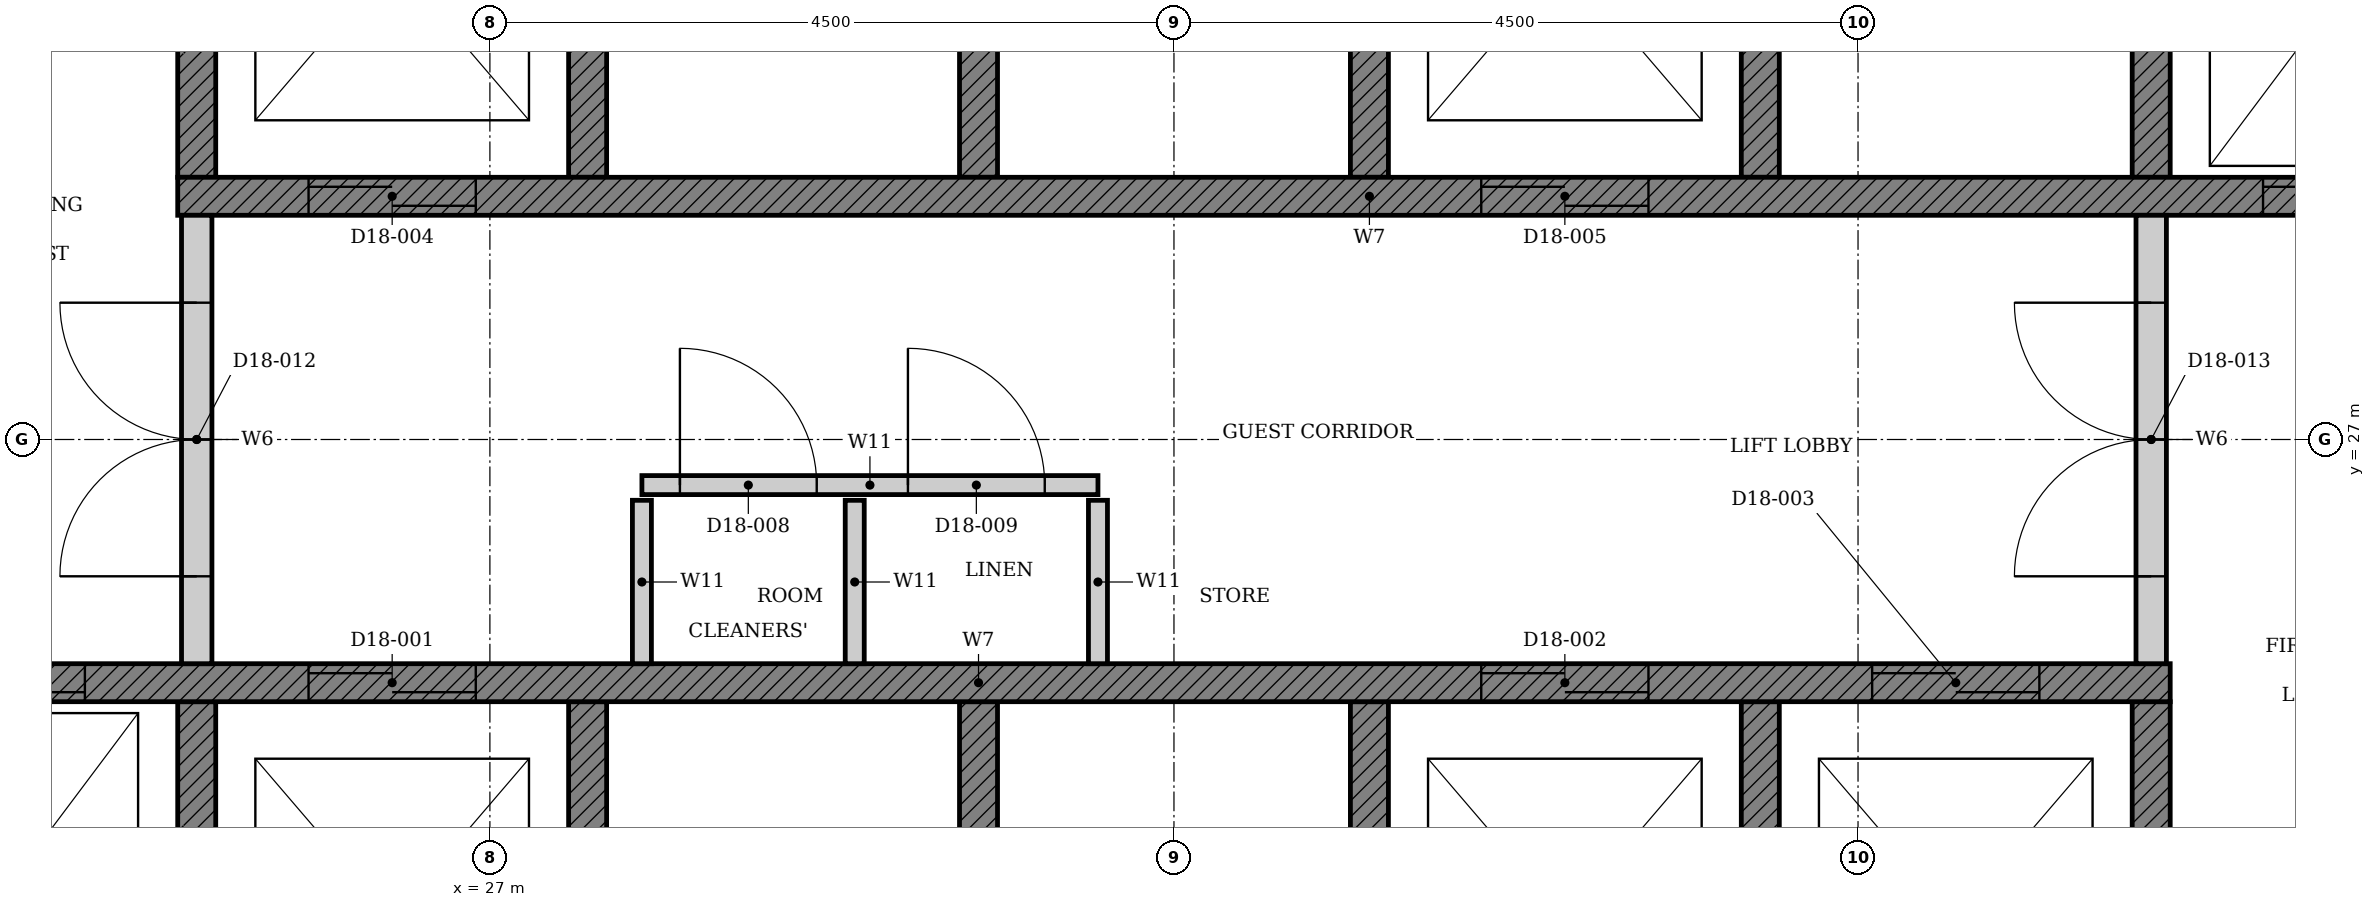
"""IFC4 building model, lengths in metres.
Left out: names, types, materials, properties, quantities, classifications, styles, units other than length and angle.
Written with IfcOpenShell. Run it as: python <this file> out.ifc"""

import sys

from ifc_helpers import new_model, si_unit, direction, frame, frame_2d, origin, place, context, subcontext, project, spatial, polyline, rectangle, outline, extrude, element, fill, save


model = new_model("IFC4")
c1 = context("Model", 3, precision=1e-05, world=origin(), true_north=direction((0.0, 1.0)))
c2 = subcontext(c1, "Body", "Model", "MODEL_VIEW")
j1 = project(units=[si_unit("LENGTHUNIT", "METRE"), si_unit("PLANEANGLEUNIT", "RADIAN")], contexts=[c1])
p1 = place(None, origin())
s1 = spatial("IfcSite", under=j1, at=p1, CompositionType="ELEMENT")
p2 = place(p1, origin())
s2 = spatial("IfcBuilding", under=s1, at=p2, CompositionType="ELEMENT")
p3 = place(p2, frame((0.0, 0.0, 78.0)))
s3 = spatial("IfcBuildingStorey", under=s2, at=p3, CompositionType="ELEMENT", Elevation=78.0)
p4 = place(p3, origin())
e1 = element("IfcWall", 1, at=p4, inside=s3, PredefinedType="SHEAR", context=c2, shape_type="SweptSolid", body=[
    extrude(outline(polyline([(22.375, 22.35), (38.053, 22.35), (38.053, 25.275), (37.803, 25.275), (37.803, 22.65), (35.482, 22.65), (35.482, 25.275), (35.232, 25.275), (35.232, 22.65), (32.911, 22.65), (32.911, 25.275), (32.661, 25.275), (32.661, 22.65), (30.339, 22.65), (30.339, 25.275), (30.089, 25.275), (30.089, 22.65), (27.768, 22.65), (27.768, 25.275), (27.518, 25.275), (27.518, 22.65), (25.197, 22.65), (25.197, 25.275), (24.947, 25.275), (24.947, 22.65), (22.625, 22.65), (22.625, 25.275), (22.375, 25.275), (22.375, 22.35)])), origin(), (0.0, 0.0, 1.0), 3.3),
])
p5 = place(p3, origin())
e2 = element("IfcWall", 2, at=p5, inside=s3, PredefinedType="SHEAR", context=c2, shape_type="SweptSolid", body=[
    extrude(outline(polyline([(24.947, 28.725), (25.197, 28.725), (25.197, 31.35), (27.518, 31.35), (27.518, 28.725), (27.768, 28.725), (27.768, 31.35), (30.089, 31.35), (30.089, 28.725), (30.339, 28.725), (30.339, 31.35), (32.661, 31.35), (32.661, 28.725), (32.911, 28.725), (32.911, 31.35), (35.232, 31.35), (35.232, 28.725), (35.482, 28.725), (35.482, 31.35), (37.803, 31.35), (37.803, 28.725), (38.053, 28.725), (38.053, 31.35), (40.375, 31.35), (40.375, 28.725), (40.625, 28.725), (40.625, 31.65), (24.947, 31.65), (24.947, 28.725)])), origin(), (0.0, 0.0, 1.0), 3.3),
])
p6 = place(p3, frame((22.375, 25.4, 0.0), z_axis=(0.0, 0.0, 1.0), x_axis=(1.0, 0.0, 0.0)))
e3 = element("IfcWall", 3, at=p6, inside=s3, PredefinedType="SHEAR", context=c2, shape_type="SweptSolid", body=[
    extrude(rectangle(XDim=15.678, YDim=0.25, at=frame_2d((7.839, 0.0))), origin(), (0.0, 0.0, 1.0), 3.3),
])
p7 = place(p6, frame((3.432, 0.0, 0.0)))
e4 = element("IfcOpeningElement", 4, at=p7, cuts=e3, PredefinedType="OPENING", context=c2, shape_type="SweptSolid", body=[
    extrude(rectangle(XDim=1.1, YDim=2.1, at=frame_2d((0.55, 1.05))), frame((0.0, 0.135, 0.0), z_axis=(0.0, -1.0, 0.0), x_axis=(1.0, 0.0, 0.0)), (0.0, 0.0, 1.0), 0.27),
])
p8 = place(p6, frame((11.146, 0.0, 0.0)))
e5 = element("IfcOpeningElement", 5, at=p8, cuts=e3, PredefinedType="OPENING", context=c2, shape_type="SweptSolid", body=[
    extrude(rectangle(XDim=1.1, YDim=2.1, at=frame_2d((0.55, 1.05))), frame((0.0, 0.135, 0.0), z_axis=(0.0, -1.0, 0.0), x_axis=(1.0, 0.0, 0.0)), (0.0, 0.0, 1.0), 0.27),
])
p9 = place(p6, frame((13.718, 0.0, 0.0)))
e6 = element("IfcOpeningElement", 6, at=p9, cuts=e3, PredefinedType="OPENING", context=c2, shape_type="SweptSolid", body=[
    extrude(rectangle(XDim=1.1, YDim=2.1, at=frame_2d((0.55, 1.05))), frame((0.0, 0.135, 0.0), z_axis=(0.0, -1.0, 0.0), x_axis=(1.0, 0.0, 0.0)), (0.0, 0.0, 1.0), 0.27),
])
p10 = place(p6, frame((0.861, 0.0, 0.0)))
e7 = element("IfcOpeningElement", 7, at=p10, cuts=e3, PredefinedType="OPENING", context=c2, shape_type="SweptSolid", body=[
    extrude(rectangle(XDim=1.1, YDim=2.1, at=frame_2d((0.55, 1.05))), frame((0.0, 0.135, 0.0), z_axis=(0.0, -1.0, 0.0), x_axis=(1.0, 0.0, 0.0)), (0.0, 0.0, 1.0), 0.27),
])
p11 = place(p3, frame((24.947, 28.6, 0.0), z_axis=(0.0, 0.0, 1.0), x_axis=(1.0, 0.0, 0.0)))
e8 = element("IfcWall", 8, at=p11, inside=s3, PredefinedType="SHEAR", context=c2, shape_type="SweptSolid", body=[
    extrude(rectangle(XDim=15.678, YDim=0.25, at=frame_2d((7.839, 0.0))), origin(), (0.0, 0.0, 1.0), 3.3),
])
p12 = place(p11, frame((0.861, 0.0, 0.0)))
e9 = element("IfcOpeningElement", 9, at=p12, cuts=e8, PredefinedType="OPENING", context=c2, shape_type="SweptSolid", body=[
    extrude(rectangle(XDim=1.1, YDim=2.1, at=frame_2d((0.55, 1.05))), frame((0.0, 0.135, 0.0), z_axis=(0.0, -1.0, 0.0), x_axis=(1.0, 0.0, 0.0)), (0.0, 0.0, 1.0), 0.27),
])
p13 = place(p11, frame((8.575, 0.0, 0.0)))
e10 = element("IfcOpeningElement", 10, at=p13, cuts=e8, PredefinedType="OPENING", context=c2, shape_type="SweptSolid", body=[
    extrude(rectangle(XDim=1.1, YDim=2.1, at=frame_2d((0.55, 1.05))), frame((0.0, 0.135, 0.0), z_axis=(0.0, -1.0, 0.0), x_axis=(1.0, 0.0, 0.0)), (0.0, 0.0, 1.0), 0.27),
])
p14 = place(p11, frame((13.718, 0.0, 0.0)))
e11 = element("IfcOpeningElement", 11, at=p14, cuts=e8, PredefinedType="OPENING", context=c2, shape_type="SweptSolid", body=[
    extrude(rectangle(XDim=1.1, YDim=2.1, at=frame_2d((0.55, 1.05))), frame((0.0, 0.135, 0.0), z_axis=(0.0, -1.0, 0.0), x_axis=(1.0, 0.0, 0.0)), (0.0, 0.0, 1.0), 0.27),
])
p15 = place(p3, frame((28.0, 26.7, 0.0), z_axis=(0.0, 0.0, 1.0), x_axis=(1.0, 0.0, 0.0)))
e12 = element("IfcWall", 12, at=p15, inside=s3, PredefinedType="PARTITIONING", context=c2, shape_type="SweptSolid", body=[
    extrude(rectangle(XDim=3.0, YDim=0.125, at=frame_2d((1.5, 0.0))), origin(), (0.0, 0.0, 1.0), 3.3),
])
p16 = place(p15, frame((0.25, 0.0, 0.0)))
e13 = element("IfcOpeningElement", 13, at=p16, cuts=e12, PredefinedType="OPENING", context=c2, shape_type="SweptSolid", body=[
    extrude(rectangle(XDim=0.9, YDim=2.1, at=frame_2d((0.45, 1.05))), frame((0.0, 0.073, 0.0), z_axis=(0.0, -1.0, 0.0), x_axis=(1.0, 0.0, 0.0)), (0.0, 0.0, 1.0), 0.145),
])
p17 = place(p15, frame((1.75, 0.0, 0.0)))
e14 = element("IfcOpeningElement", 14, at=p17, cuts=e12, PredefinedType="OPENING", context=c2, shape_type="SweptSolid", body=[
    extrude(rectangle(XDim=0.9, YDim=2.1, at=frame_2d((0.45, 1.05))), frame((0.0, 0.073, 0.0), z_axis=(0.0, -1.0, 0.0), x_axis=(1.0, 0.0, 0.0)), (0.0, 0.0, 1.0), 0.145),
])
for number, where, z_axis, x_axis in (
    (15, (28.0, 25.525, 0.0), (0.0, 0.0, 1.0), (0.0, 1.0, 0.0)),
    (16, (29.4, 25.525, 0.0), (0.0, 0.0, 1.0), (0.0, 1.0, 0.0)),
    (17, (31.0, 25.525, 0.0), (0.0, 0.0, 1.0), (0.0, 1.0, 0.0)),
):
    element("IfcWall", number, at=place(p3, frame(where, z_axis=z_axis, x_axis=x_axis)), inside=s3, PredefinedType="PARTITIONING", context=c2, shape_type="SweptSolid", body=[
        extrude(rectangle(XDim=1.075, YDim=0.125, at=frame_2d((0.538, 0.0))), origin(), (0.0, 0.0, 1.0), 3.3),
    ])
p18 = place(p3, frame((25.072, 25.525, 0.0), z_axis=(0.0, 0.0, 1.0), x_axis=(0.0, 1.0, 0.0)))
e18 = element("IfcWall", 18, at=p18, inside=s3, PredefinedType="PARTITIONING", context=c2, shape_type="SweptSolid", body=[
    extrude(rectangle(XDim=2.95, YDim=0.2, at=frame_2d((1.475, 0.0))), origin(), (0.0, 0.0, 1.0), 3.3),
])
p19 = place(p18, frame((0.575, 0.0, 0.0)))
e19 = element("IfcOpeningElement", 19, at=p19, cuts=e18, PredefinedType="OPENING", context=c2, shape_type="SweptSolid", body=[
    extrude(rectangle(XDim=1.8, YDim=2.1, at=frame_2d((0.9, 1.05))), frame((0.0, 0.11, 0.0), z_axis=(0.0, -1.0, 0.0), x_axis=(1.0, 0.0, 0.0)), (0.0, 0.0, 1.0), 0.22),
])
p20 = place(p3, frame((37.928, 25.525, 0.0), z_axis=(0.0, 0.0, 1.0), x_axis=(0.0, 1.0, 0.0)))
e20 = element("IfcWall", 20, at=p20, inside=s3, PredefinedType="PARTITIONING", context=c2, shape_type="SweptSolid", body=[
    extrude(rectangle(XDim=2.95, YDim=0.2, at=frame_2d((1.475, 0.0))), origin(), (0.0, 0.0, 1.0), 3.3),
])
p21 = place(p20, frame((0.575, 0.0, 0.0)))
e21 = element("IfcOpeningElement", 21, at=p21, cuts=e20, PredefinedType="OPENING", context=c2, shape_type="SweptSolid", body=[
    extrude(rectangle(XDim=1.8, YDim=2.1, at=frame_2d((0.9, 1.05))), frame((0.0, 0.11, 0.0), z_axis=(0.0, -1.0, 0.0), x_axis=(1.0, 0.0, 0.0)), (0.0, 0.0, 1.0), 0.22),
])
p22 = place(p7, origin())
e22 = element("IfcDoor", 22, at=p22, inside=s3, OperationType="DOUBLE_DOOR_SLIDING", PredefinedType="DOOR", context=c2, shape_type="SweptSolid", body=[
    extrude(rectangle(XDim=1.1, YDim=2.1, at=frame_2d((0.55, 1.05))), frame((0.0, 0.025, 0.0), z_axis=(0.0, -1.0, 0.0), x_axis=(1.0, 0.0, 0.0)), (0.0, 0.0, 1.0), 0.05),
])
fill(e4, e22)
p23 = place(p8, origin())
e23 = element("IfcDoor", 23, at=p23, inside=s3, OperationType="DOUBLE_DOOR_SLIDING", PredefinedType="DOOR", context=c2, shape_type="SweptSolid", body=[
    extrude(rectangle(XDim=1.1, YDim=2.1, at=frame_2d((0.55, 1.05))), frame((0.0, 0.025, 0.0), z_axis=(0.0, -1.0, 0.0), x_axis=(1.0, 0.0, 0.0)), (0.0, 0.0, 1.0), 0.05),
])
fill(e5, e23)
p24 = place(p9, origin())
e24 = element("IfcDoor", 24, at=p24, inside=s3, OperationType="DOUBLE_DOOR_SLIDING", PredefinedType="DOOR", context=c2, shape_type="SweptSolid", body=[
    extrude(rectangle(XDim=1.1, YDim=2.1, at=frame_2d((0.55, 1.05))), frame((0.0, 0.025, 0.0), z_axis=(0.0, -1.0, 0.0), x_axis=(1.0, 0.0, 0.0)), (0.0, 0.0, 1.0), 0.05),
])
fill(e6, e24)
p25 = place(p12, origin())
e25 = element("IfcDoor", 25, at=p25, inside=s3, OperationType="DOUBLE_DOOR_SLIDING", PredefinedType="DOOR", context=c2, shape_type="SweptSolid", body=[
    extrude(rectangle(XDim=1.1, YDim=2.1, at=frame_2d((0.55, 1.05))), frame((0.0, 0.025, 0.0), z_axis=(0.0, -1.0, 0.0), x_axis=(1.0, 0.0, 0.0)), (0.0, 0.0, 1.0), 0.05),
])
fill(e9, e25)
p26 = place(p13, origin())
e26 = element("IfcDoor", 26, at=p26, inside=s3, OperationType="DOUBLE_DOOR_SLIDING", PredefinedType="DOOR", context=c2, shape_type="SweptSolid", body=[
    extrude(rectangle(XDim=1.1, YDim=2.1, at=frame_2d((0.55, 1.05))), frame((0.0, 0.025, 0.0), z_axis=(0.0, -1.0, 0.0), x_axis=(1.0, 0.0, 0.0)), (0.0, 0.0, 1.0), 0.05),
])
fill(e10, e26)
p27 = place(p10, origin())
e27 = element("IfcDoor", 27, at=p27, inside=s3, OperationType="DOUBLE_DOOR_SLIDING", PredefinedType="DOOR", context=c2, shape_type="SweptSolid", body=[
    extrude(rectangle(XDim=1.1, YDim=2.1, at=frame_2d((0.55, 1.05))), frame((0.0, 0.025, 0.0), z_axis=(0.0, -1.0, 0.0), x_axis=(1.0, 0.0, 0.0)), (0.0, 0.0, 1.0), 0.05),
])
fill(e7, e27)
p28 = place(p14, origin())
e28 = element("IfcDoor", 28, at=p28, inside=s3, OperationType="DOUBLE_DOOR_SLIDING", PredefinedType="DOOR", context=c2, shape_type="SweptSolid", body=[
    extrude(rectangle(XDim=1.1, YDim=2.1, at=frame_2d((0.55, 1.05))), frame((0.0, 0.025, 0.0), z_axis=(0.0, -1.0, 0.0), x_axis=(1.0, 0.0, 0.0)), (0.0, 0.0, 1.0), 0.05),
])
fill(e11, e28)
p29 = place(p16, origin())
e29 = element("IfcDoor", 29, at=p29, inside=s3, OperationType="SINGLE_SWING_LEFT", PredefinedType="DOOR", context=c2, shape_type="SweptSolid", body=[
    extrude(rectangle(XDim=0.9, YDim=2.1, at=frame_2d((0.45, 1.05))), frame((0.0, 0.025, 0.0), z_axis=(0.0, -1.0, 0.0), x_axis=(1.0, 0.0, 0.0)), (0.0, 0.0, 1.0), 0.05),
])
fill(e13, e29)
p30 = place(p17, origin())
e30 = element("IfcDoor", 30, at=p30, inside=s3, OperationType="SINGLE_SWING_LEFT", PredefinedType="DOOR", context=c2, shape_type="SweptSolid", body=[
    extrude(rectangle(XDim=0.9, YDim=2.1, at=frame_2d((0.45, 1.05))), frame((0.0, 0.025, 0.0), z_axis=(0.0, -1.0, 0.0), x_axis=(1.0, 0.0, 0.0)), (0.0, 0.0, 1.0), 0.05),
])
fill(e14, e30)
p31 = place(p19, origin())
e31 = element("IfcDoor", 31, at=p31, inside=s3, OperationType="DOUBLE_DOOR_SINGLE_SWING", PredefinedType="DOOR", context=c2, shape_type="SweptSolid", body=[
    extrude(rectangle(XDim=1.8, YDim=2.1, at=frame_2d((0.9, 1.05))), frame((0.0, 0.025, 0.0), z_axis=(0.0, -1.0, 0.0), x_axis=(1.0, 0.0, 0.0)), (0.0, 0.0, 1.0), 0.05),
])
fill(e19, e31)
p32 = place(p21, origin())
e32 = element("IfcDoor", 32, at=p32, inside=s3, OperationType="DOUBLE_DOOR_SINGLE_SWING", PredefinedType="DOOR", context=c2, shape_type="SweptSolid", body=[
    extrude(rectangle(XDim=1.8, YDim=2.1, at=frame_2d((0.9, 1.05))), frame((0.0, 0.025, 0.0), z_axis=(0.0, -1.0, 0.0), x_axis=(1.0, 0.0, 0.0)), (0.0, 0.0, 1.0), 0.05),
])
fill(e21, e32)
save(model, sys.argv[1])
